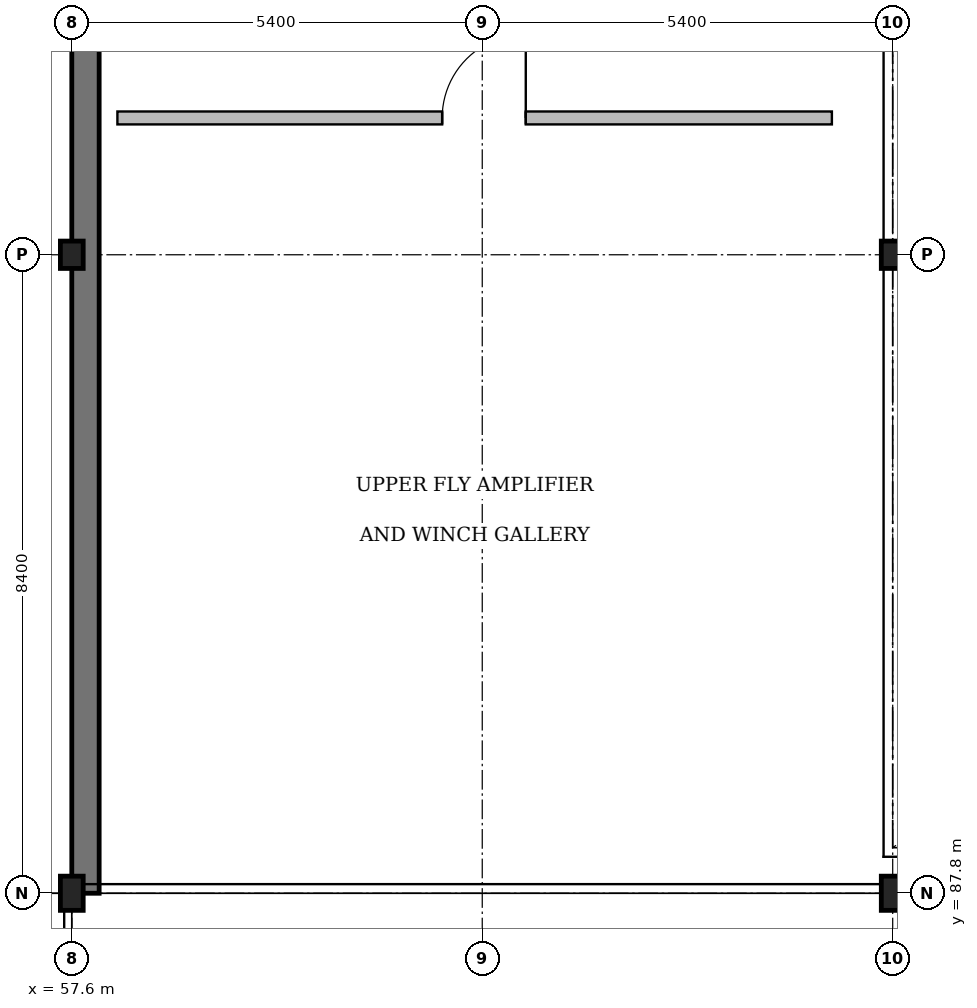
"""IFC4 building model, lengths in metres.
Left out: names, types, materials, properties, quantities, classifications, styles, units other than length and angle.
Written with IfcOpenShell. Run it as: python <this file> out.ifc"""

import sys

from ifc_helpers import new_model, si_unit, direction, frame, frame_2d, origin, origin_2d, place, context, subcontext, project, spatial, rectangle, i_section, extrude, element, fill, save


model = new_model("IFC4")
c1 = context("Model", 3, precision=1e-05, world=origin(), true_north=direction((0.0, 1.0)))
c2 = subcontext(c1, "Body", "Model", "MODEL_VIEW")
j1 = project(units=[si_unit("LENGTHUNIT", "METRE"), si_unit("PLANEANGLEUNIT", "RADIAN")], contexts=[c1])
p1 = place(None, origin())
s1 = spatial("IfcSite", under=j1, at=p1, CompositionType="ELEMENT")
p2 = place(p1, origin())
s2 = spatial("IfcBuilding", under=s1, at=p2, CompositionType="ELEMENT")
p3 = place(p2, frame((0.0, 0.0, 13.2)))
s3 = spatial("IfcBuildingStorey", under=s2, at=p3, CompositionType="ELEMENT", Elevation=13.2)
p4 = place(p3, frame((68.4, 87.8, 0.0), z_axis=(0.0, 0.0, 1.0), x_axis=(1.0, 0.0, 0.0)))
e1 = element("IfcColumn", 1, at=p4, inside=s3, PredefinedType="COLUMN", context=c2, shape_type="SweptSolid", body=[
    extrude(i_section(OverallWidth=0.3, OverallDepth=0.45, WebThickness=0.014, FlangeThickness=0.026, FilletRadius=0.027, at=origin_2d()), origin(), (0.0, 0.0, 1.0), 3.9),
])
p5 = place(p3, frame((68.4, 96.2, 0.0), z_axis=(0.0, 0.0, 1.0), x_axis=(1.0, 0.0, 0.0)))
e2 = element("IfcColumn", 2, at=p5, inside=s3, PredefinedType="COLUMN", context=c2, shape_type="SweptSolid", body=[
    extrude(i_section(OverallWidth=0.3, OverallDepth=0.36, WebThickness=0.012, FlangeThickness=0.022, FilletRadius=0.027, at=origin_2d()), origin(), (0.0, 0.0, 1.0), 3.9),
])
p6 = place(p3, frame((57.6, 87.8, 0.0), z_axis=(0.0, 0.0, 1.0), x_axis=(1.0, 0.0, 0.0)))
e3 = element("IfcColumn", 3, at=p6, inside=s3, PredefinedType="COLUMN", context=c2, shape_type="SweptSolid", body=[
    extrude(i_section(OverallWidth=0.3, OverallDepth=0.45, WebThickness=0.014, FlangeThickness=0.026, FilletRadius=0.027, at=origin_2d()), origin(), (0.0, 0.0, 1.0), 3.9),
])
p7 = place(p3, frame((57.6, 96.2, 0.0), z_axis=(0.0, 0.0, 1.0), x_axis=(1.0, 0.0, 0.0)))
e4 = element("IfcColumn", 4, at=p7, inside=s3, PredefinedType="COLUMN", context=c2, shape_type="SweptSolid", body=[
    extrude(i_section(OverallWidth=0.3, OverallDepth=0.36, WebThickness=0.012, FlangeThickness=0.022, FilletRadius=0.027, at=origin_2d()), origin(), (0.0, 0.0, 1.0), 3.9),
])
p8 = place(p3, frame((57.78, 87.8, 0.0), z_axis=(0.0, 0.0, 1.0), x_axis=(0.0, 1.0, 0.0)))
e5 = element("IfcWall", 5, at=p8, inside=s3, PredefinedType="SOLIDWALL", context=c2, shape_type="SweptSolid", body=[
    extrude(rectangle(XDim=24.0, YDim=0.36, at=frame_2d((12.0, 0.0))), origin(), (0.0, 0.0, 1.0), 3.65),
])
p9 = place(p3, frame((58.2, 98.0, 0.0), z_axis=(0.0, 0.0, 1.0), x_axis=(1.0, 0.0, 0.0)))
e6 = element("IfcWall", 6, at=p9, inside=s3, PredefinedType="PARTITIONING", context=c2, shape_type="SweptSolid", body=[
    extrude(rectangle(XDim=9.4, YDim=0.17, at=frame_2d((4.7, 0.0))), origin(), (0.0, 0.0, 1.0), 3.65),
])
p10 = place(p9, frame((4.273, 0.0, 0.0)))
e7 = element("IfcOpeningElement", 7, at=p10, cuts=e6, PredefinedType="OPENING", context=c2, shape_type="SweptSolid", body=[
    extrude(rectangle(XDim=1.1, YDim=2.1, at=frame_2d((0.55, 1.05))), frame((0.0, 0.105, 0.0), z_axis=(0.0, -1.0, 0.0), x_axis=(1.0, 0.0, 0.0)), (0.0, 0.0, 1.0), 0.21),
])
p11 = place(p10, origin())
e8 = element("IfcDoor", 8, at=p11, inside=s3, OperationType="SINGLE_SWING_RIGHT", PredefinedType="DOOR", context=c2, shape_type="SweptSolid", body=[
    extrude(rectangle(XDim=1.1, YDim=2.1, at=frame_2d((0.55, 1.05))), frame((0.0, 0.025, 0.0), z_axis=(0.0, -1.0, 0.0), x_axis=(1.0, 0.0, 0.0)), (0.0, 0.0, 1.0), 0.05),
])
fill(e7, e8)
save(model, sys.argv[1])
